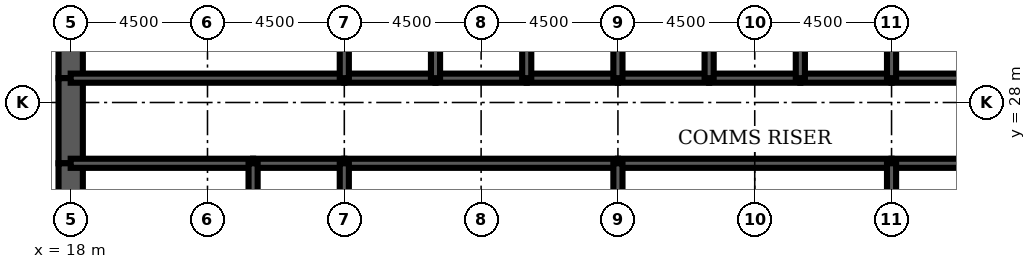
"""IFC4 building model, lengths in metres.
Left out: names, types, materials, properties, quantities, classifications, styles, units other than length and angle.
Written with IfcOpenShell. Run it as: python <this file> out.ifc"""

import sys

from ifc_helpers import new_model, si_unit, direction, frame, frame_2d, origin, place, context, subcontext, project, spatial, rectangle, extrude, element, fill, save


model = new_model("IFC4")
c1 = context("Model", 3, precision=1e-05, world=origin(), true_north=direction((0.0, 1.0)))
c2 = subcontext(c1, "Body", "Model", "MODEL_VIEW")
j1 = project(units=[si_unit("LENGTHUNIT", "METRE"), si_unit("PLANEANGLEUNIT", "RADIAN")], contexts=[c1])
p1 = place(None, origin())
s1 = spatial("IfcSite", under=j1, at=p1, CompositionType="ELEMENT")
p2 = place(p1, origin())
s2 = spatial("IfcBuilding", under=s1, at=p2, CompositionType="ELEMENT")
p3 = place(p2, frame((0.0, 0.0, 219.4)))
s3 = spatial("IfcBuildingStorey", under=s2, at=p3, CompositionType="ELEMENT", Elevation=219.4)
p4 = place(p3, frame((18.0, 32.0, 0.0), z_axis=(0.0, 0.0, 1.0), x_axis=(0.0, -1.0, 0.0)))
e1 = element("IfcWall", 1, at=p4, inside=s3, PredefinedType="SHEAR", context=c2, shape_type="SweptSolid", body=[
    extrude(rectangle(XDim=3.2, YDim=0.8, at=frame_2d((1.6, 0.0))), origin(), (0.0, 0.0, 1.0), 4.2),
])
p5 = place(p3, frame((18.0, 28.8, 0.0), z_axis=(0.0, 0.0, 1.0), x_axis=(0.0, -1.0, 0.0)))
e2 = element("IfcWall", 2, at=p5, inside=s3, PredefinedType="SHEAR", context=c2, shape_type="SweptSolid", body=[
    extrude(rectangle(XDim=2.8, YDim=0.8, at=frame_2d((1.4, 0.0))), origin(), (0.0, 0.0, 1.0), 4.2),
])
p6 = place(p5, frame((0.4, 0.0, 0.0)))
e3 = element("IfcOpeningElement", 3, at=p6, cuts=e2, PredefinedType="OPENING", context=c2, shape_type="SweptSolid", body=[
    extrude(rectangle(XDim=1.8, YDim=2.1, at=frame_2d((0.9, 1.05))), frame((0.0, 0.41, 0.0), z_axis=(0.0, -1.0, 0.0), x_axis=(1.0, 0.0, 0.0)), (0.0, 0.0, 1.0), 0.82),
])
p7 = place(p3, frame((18.0, 26.0, 0.0), z_axis=(0.0, 0.0, 1.0), x_axis=(0.0, -1.0, 0.0)))
e4 = element("IfcWall", 4, at=p7, inside=s3, PredefinedType="SHEAR", context=c2, shape_type="SweptSolid", body=[
    extrude(rectangle(XDim=4.0, YDim=0.8, at=frame_2d((2.0, 0.0))), origin(), (0.0, 0.0, 1.0), 4.2),
])
p8 = place(p3, frame((18.0, 28.8, 0.0), z_axis=(0.0, 0.0, 1.0), x_axis=(1.0, 0.0, 0.0)))
e5 = element("IfcWall", 5, at=p8, inside=s3, PredefinedType="SOLIDWALL", context=c2, shape_type="SweptSolid", body=[
    extrude(rectangle(XDim=9.0, YDim=0.3, at=frame_2d((4.5, 0.0))), origin(), (0.0, 0.0, 1.0), 4.2),
])
p9 = place(p8, frame((0.65, 0.0, 0.0)))
e6 = element("IfcOpeningElement", 6, at=p9, cuts=e5, PredefinedType="OPENING", context=c2, shape_type="SweptSolid", body=[
    extrude(rectangle(XDim=1.0, YDim=2.1, at=frame_2d((0.5, 1.05))), frame((0.0, 0.16, 0.0), z_axis=(0.0, -1.0, 0.0), x_axis=(1.0, 0.0, 0.0)), (0.0, 0.0, 1.0), 0.32),
])
p10 = place(p3, frame((27.0, 28.8, 0.0), z_axis=(0.0, 0.0, 1.0), x_axis=(1.0, 0.0, 0.0)))
e7 = element("IfcWall", 7, at=p10, inside=s3, PredefinedType="SOLIDWALL", context=c2, shape_type="SweptSolid", body=[
    extrude(rectangle(XDim=3.0, YDim=0.3, at=frame_2d((1.5, 0.0))), origin(), (0.0, 0.0, 1.0), 4.2),
])
p11 = place(p10, frame((0.95, 0.0, 0.0)))
e8 = element("IfcOpeningElement", 8, at=p11, cuts=e7, PredefinedType="OPENING", context=c2, shape_type="SweptSolid", body=[
    extrude(rectangle(XDim=1.1, YDim=2.2, at=frame_2d((0.55, 1.1))), frame((0.0, 0.16, 0.0), z_axis=(0.0, -1.0, 0.0), x_axis=(1.0, 0.0, 0.0)), (0.0, 0.0, 1.0), 0.32),
])
p12 = place(p3, frame((30.0, 28.8, 0.0), z_axis=(0.0, 0.0, 1.0), x_axis=(1.0, 0.0, 0.0)))
e9 = element("IfcWall", 9, at=p12, inside=s3, PredefinedType="SOLIDWALL", context=c2, shape_type="SweptSolid", body=[
    extrude(rectangle(XDim=3.0, YDim=0.3, at=frame_2d((1.5, 0.0))), origin(), (0.0, 0.0, 1.0), 4.2),
])
p13 = place(p12, frame((0.95, 0.0, 0.0)))
e10 = element("IfcOpeningElement", 10, at=p13, cuts=e9, PredefinedType="OPENING", context=c2, shape_type="SweptSolid", body=[
    extrude(rectangle(XDim=1.1, YDim=2.2, at=frame_2d((0.55, 1.1))), frame((0.0, 0.16, 0.0), z_axis=(0.0, -1.0, 0.0), x_axis=(1.0, 0.0, 0.0)), (0.0, 0.0, 1.0), 0.32),
])
p14 = place(p3, frame((33.0, 28.8, 0.0), z_axis=(0.0, 0.0, 1.0), x_axis=(1.0, 0.0, 0.0)))
e11 = element("IfcWall", 11, at=p14, inside=s3, PredefinedType="SOLIDWALL", context=c2, shape_type="SweptSolid", body=[
    extrude(rectangle(XDim=3.0, YDim=0.3, at=frame_2d((1.5, 0.0))), origin(), (0.0, 0.0, 1.0), 4.2),
])
p15 = place(p14, frame((0.95, 0.0, 0.0)))
e12 = element("IfcOpeningElement", 12, at=p15, cuts=e11, PredefinedType="OPENING", context=c2, shape_type="SweptSolid", body=[
    extrude(rectangle(XDim=1.1, YDim=2.2, at=frame_2d((0.55, 1.1))), frame((0.0, 0.16, 0.0), z_axis=(0.0, -1.0, 0.0), x_axis=(1.0, 0.0, 0.0)), (0.0, 0.0, 1.0), 0.32),
])
for number, where, z_axis, x_axis in (
    (13, (36.0, 28.8, 0.0), (0.0, 0.0, 1.0), (1.0, 0.0, 0.0)),
    (14, (39.0, 28.8, 0.0), (0.0, 0.0, 1.0), (1.0, 0.0, 0.0)),
):
    element("IfcWall", number, at=place(p3, frame(where, z_axis=z_axis, x_axis=x_axis)), inside=s3, PredefinedType="SOLIDWALL", context=c2, shape_type="SweptSolid", body=[
        extrude(rectangle(XDim=3.0, YDim=0.3, at=frame_2d((1.5, 0.0))), origin(), (0.0, 0.0, 1.0), 4.2),
    ])
p16 = place(p3, frame((42.0, 28.8, 0.0), z_axis=(0.0, 0.0, 1.0), x_axis=(1.0, 0.0, 0.0)))
e15 = element("IfcWall", 15, at=p16, inside=s3, PredefinedType="SOLIDWALL", context=c2, shape_type="SweptSolid", body=[
    extrude(rectangle(XDim=3.0, YDim=0.3, at=frame_2d((1.5, 0.0))), origin(), (0.0, 0.0, 1.0), 4.2),
])
p17 = place(p16, frame((0.95, 0.0, 0.0)))
e16 = element("IfcOpeningElement", 16, at=p17, cuts=e15, PredefinedType="OPENING", context=c2, shape_type="SweptSolid", body=[
    extrude(rectangle(XDim=1.1, YDim=2.2, at=frame_2d((0.55, 1.1))), frame((0.0, 0.16, 0.0), z_axis=(0.0, -1.0, 0.0), x_axis=(1.0, 0.0, 0.0)), (0.0, 0.0, 1.0), 0.32),
])
p18 = place(p3, frame((45.0, 28.8, 0.0), z_axis=(0.0, 0.0, 1.0), x_axis=(1.0, 0.0, 0.0)))
e17 = element("IfcWall", 17, at=p18, inside=s3, PredefinedType="SOLIDWALL", context=c2, shape_type="SweptSolid", body=[
    extrude(rectangle(XDim=9.0, YDim=0.3, at=frame_2d((4.5, 0.0))), origin(), (0.0, 0.0, 1.0), 4.2),
])
p19 = place(p18, frame((7.35, 0.0, 0.0)))
e18 = element("IfcOpeningElement", 18, at=p19, cuts=e17, PredefinedType="OPENING", context=c2, shape_type="SweptSolid", body=[
    extrude(rectangle(XDim=1.0, YDim=2.1, at=frame_2d((0.5, 1.05))), frame((0.0, 0.16, 0.0), z_axis=(0.0, -1.0, 0.0), x_axis=(1.0, 0.0, 0.0)), (0.0, 0.0, 1.0), 0.32),
])
p20 = place(p3, frame((18.0, 26.0, 0.0), z_axis=(0.0, 0.0, 1.0), x_axis=(1.0, 0.0, 0.0)))
e19 = element("IfcWall", 19, at=p20, inside=s3, PredefinedType="SOLIDWALL", context=c2, shape_type="SweptSolid", body=[
    extrude(rectangle(XDim=6.0, YDim=0.3, at=frame_2d((3.0, 0.0))), origin(), (0.0, 0.0, 1.0), 4.2),
])
p21 = place(p3, frame((24.0, 26.0, 0.0), z_axis=(0.0, 0.0, 1.0), x_axis=(1.0, 0.0, 0.0)))
e20 = element("IfcWall", 20, at=p21, inside=s3, PredefinedType="SOLIDWALL", context=c2, shape_type="SweptSolid", body=[
    extrude(rectangle(XDim=3.0, YDim=0.3, at=frame_2d((1.5, 0.0))), origin(), (0.0, 0.0, 1.0), 4.2),
])
for number, where, z_axis, x_axis in (
    (21, (27.0, 26.0, 0.0), (0.0, 0.0, 1.0), (1.0, 0.0, 0.0)),
    (22, (36.0, 26.0, 0.0), (0.0, 0.0, 1.0), (1.0, 0.0, 0.0)),
):
    element("IfcWall", number, at=place(p3, frame(where, z_axis=z_axis, x_axis=x_axis)), inside=s3, PredefinedType="SOLIDWALL", context=c2, shape_type="SweptSolid", body=[
        extrude(rectangle(XDim=9.0, YDim=0.3, at=frame_2d((4.5, 0.0))), origin(), (0.0, 0.0, 1.0), 4.2),
    ])
p22 = place(p3, frame((45.0, 26.0, 0.0), z_axis=(0.0, 0.0, 1.0), x_axis=(1.0, 0.0, 0.0)))
e23 = element("IfcWall", 23, at=p22, inside=s3, PredefinedType="SOLIDWALL", context=c2, shape_type="SweptSolid", body=[
    extrude(rectangle(XDim=3.0, YDim=0.3, at=frame_2d((1.5, 0.0))), origin(), (0.0, 0.0, 1.0), 4.2),
])
for number, where, z_axis, x_axis in (
    (24, (27.0, 28.8, 0.0), (0.0, 0.0, 1.0), (0.0, 1.0, 0.0)),
    (25, (30.0, 28.8, 0.0), (0.0, 0.0, 1.0), (0.0, 1.0, 0.0)),
    (26, (33.0, 28.8, 0.0), (0.0, 0.0, 1.0), (0.0, 1.0, 0.0)),
    (27, (36.0, 28.8, 0.0), (0.0, 0.0, 1.0), (0.0, 1.0, 0.0)),
    (28, (39.0, 28.8, 0.0), (0.0, 0.0, 1.0), (0.0, 1.0, 0.0)),
    (29, (42.0, 28.8, 0.0), (0.0, 0.0, 1.0), (0.0, 1.0, 0.0)),
    (30, (45.0, 28.8, 0.0), (0.0, 0.0, 1.0), (0.0, 1.0, 0.0)),
):
    element("IfcWall", number, at=place(p3, frame(where, z_axis=z_axis, x_axis=x_axis)), inside=s3, PredefinedType="SOLIDWALL", context=c2, shape_type="SweptSolid", body=[
        extrude(rectangle(XDim=3.2, YDim=0.3, at=frame_2d((1.6, 0.0))), origin(), (0.0, 0.0, 1.0), 4.2),
    ])
for number, where, z_axis, x_axis in (
    (31, (24.0, 22.0, 0.0), (0.0, 0.0, 1.0), (0.0, 1.0, 0.0)),
    (32, (27.0, 22.0, 0.0), (0.0, 0.0, 1.0), (0.0, 1.0, 0.0)),
    (33, (36.0, 22.0, 0.0), (0.0, 0.0, 1.0), (0.0, 1.0, 0.0)),
    (34, (45.0, 22.0, 0.0), (0.0, 0.0, 1.0), (0.0, 1.0, 0.0)),
):
    element("IfcWall", number, at=place(p3, frame(where, z_axis=z_axis, x_axis=x_axis)), inside=s3, PredefinedType="SOLIDWALL", context=c2, shape_type="SweptSolid", body=[
        extrude(rectangle(XDim=4.0, YDim=0.3, at=frame_2d((2.0, 0.0))), origin(), (0.0, 0.0, 1.0), 4.2),
    ])
p23 = place(p3, frame((38.5, 22.15, 0.0), z_axis=(0.0, 0.0, 1.0), x_axis=(0.0, 1.0, 0.0)))
e35 = element("IfcWall", 35, at=p23, inside=s3, PredefinedType="PARTITIONING", context=c2, shape_type="SweptSolid", body=[
    extrude(rectangle(XDim=3.7, YDim=0.15, at=frame_2d((1.85, 0.0))), origin(), (0.0, 0.0, 1.0), 3.0),
])
p24 = place(p23, frame((2.2, 0.0, 0.0)))
e36 = element("IfcOpeningElement", 36, at=p24, cuts=e35, PredefinedType="OPENING", context=c2, shape_type="SweptSolid", body=[
    extrude(rectangle(XDim=1.0, YDim=2.1, at=frame_2d((0.5, 1.05))), frame((0.0, 0.085, 0.0), z_axis=(0.0, -1.0, 0.0), x_axis=(1.0, 0.0, 0.0)), (0.0, 0.0, 1.0), 0.17),
])
p25 = place(p3, frame((20.275, 22.15, 0.0), z_axis=(0.0, 0.0, 1.0), x_axis=(0.0, 1.0, 0.0)))
e37 = element("IfcWall", 37, at=p25, inside=s3, PredefinedType="PARTITIONING", context=c2, shape_type="SweptSolid", body=[
    extrude(rectangle(XDim=3.7, YDim=0.15, at=frame_2d((1.85, 0.0))), origin(), (0.0, 0.0, 1.0), 3.0),
])
p26 = place(p3, frame((46.2, 26.15, 0.0), z_axis=(0.0, 0.0, 1.0), x_axis=(0.0, 1.0, 0.0)))
e38 = element("IfcWall", 38, at=p26, inside=s3, PredefinedType="PARTITIONING", context=c2, shape_type="SweptSolid", body=[
    extrude(rectangle(XDim=2.5, YDim=0.15, at=frame_2d((1.25, 0.0))), origin(), (0.0, 0.0, 1.0), 3.0),
])
p27 = place(p26, frame((1.15, 0.0, 0.0)))
e39 = element("IfcOpeningElement", 39, at=p27, cuts=e38, PredefinedType="OPENING", context=c2, shape_type="SweptSolid", body=[
    extrude(rectangle(XDim=1.0, YDim=2.1, at=frame_2d((0.5, 1.05))), frame((0.0, 0.085, 0.0), z_axis=(0.0, -1.0, 0.0), x_axis=(1.0, 0.0, 0.0)), (0.0, 0.0, 1.0), 0.17),
])
p28 = place(p24, origin())
e40 = element("IfcDoor", 40, at=p28, inside=s3, OperationType="SINGLE_SWING_RIGHT", PredefinedType="DOOR", context=c2, shape_type="SweptSolid", body=[
    extrude(rectangle(XDim=1.0, YDim=2.1, at=frame_2d((0.5, 1.05))), frame((0.0, 0.025, 0.0), z_axis=(0.0, -1.0, 0.0), x_axis=(1.0, 0.0, 0.0)), (0.0, 0.0, 1.0), 0.05),
])
fill(e36, e40)
p29 = place(p27, origin())
e41 = element("IfcDoor", 41, at=p29, inside=s3, OperationType="SINGLE_SWING_RIGHT", PredefinedType="DOOR", context=c2, shape_type="SweptSolid", body=[
    extrude(rectangle(XDim=1.0, YDim=2.1, at=frame_2d((0.5, 1.05))), frame((0.0, 0.025, 0.0), z_axis=(0.0, -1.0, 0.0), x_axis=(1.0, 0.0, 0.0)), (0.0, 0.0, 1.0), 0.05),
])
fill(e39, e41)
p30 = place(p17, origin())
e42 = element("IfcDoor", 42, at=p30, inside=s3, OperationType="DOUBLE_DOOR_SLIDING", PredefinedType="USERDEFINED", context=c2, shape_type="SweptSolid", body=[
    extrude(rectangle(XDim=1.1, YDim=2.2, at=frame_2d((0.55, 1.1))), frame((0.0, 0.025, 0.0), z_axis=(0.0, -1.0, 0.0), x_axis=(1.0, 0.0, 0.0)), (0.0, 0.0, 1.0), 0.05),
])
fill(e16, e42)
p31 = place(p11, origin())
e43 = element("IfcDoor", 43, at=p31, inside=s3, OperationType="DOUBLE_DOOR_SLIDING", PredefinedType="USERDEFINED", context=c2, shape_type="SweptSolid", body=[
    extrude(rectangle(XDim=1.1, YDim=2.2, at=frame_2d((0.55, 1.1))), frame((0.0, 0.025, 0.0), z_axis=(0.0, -1.0, 0.0), x_axis=(1.0, 0.0, 0.0)), (0.0, 0.0, 1.0), 0.05),
])
fill(e8, e43)
p32 = place(p13, origin())
e44 = element("IfcDoor", 44, at=p32, inside=s3, OperationType="DOUBLE_DOOR_SLIDING", PredefinedType="USERDEFINED", context=c2, shape_type="SweptSolid", body=[
    extrude(rectangle(XDim=1.1, YDim=2.2, at=frame_2d((0.55, 1.1))), frame((0.0, 0.025, 0.0), z_axis=(0.0, -1.0, 0.0), x_axis=(1.0, 0.0, 0.0)), (0.0, 0.0, 1.0), 0.05),
])
fill(e10, e44)
p33 = place(p15, origin())
e45 = element("IfcDoor", 45, at=p33, inside=s3, OperationType="DOUBLE_DOOR_SLIDING", PredefinedType="USERDEFINED", context=c2, shape_type="SweptSolid", body=[
    extrude(rectangle(XDim=1.1, YDim=2.2, at=frame_2d((0.55, 1.1))), frame((0.0, 0.025, 0.0), z_axis=(0.0, -1.0, 0.0), x_axis=(1.0, 0.0, 0.0)), (0.0, 0.0, 1.0), 0.05),
])
fill(e12, e45)
p34 = place(p9, origin())
e46 = element("IfcDoor", 46, at=p34, inside=s3, OperationType="SINGLE_SWING_LEFT", PredefinedType="DOOR", context=c2, shape_type="SweptSolid", body=[
    extrude(rectangle(XDim=1.0, YDim=2.1, at=frame_2d((0.5, 1.05))), frame((0.0, 0.025, 0.0), z_axis=(0.0, -1.0, 0.0), x_axis=(1.0, 0.0, 0.0)), (0.0, 0.0, 1.0), 0.05),
])
fill(e6, e46)
p35 = place(p6, origin())
e47 = element("IfcDoor", 47, at=p35, inside=s3, OperationType="SINGLE_SWING_LEFT", PredefinedType="DOOR", context=c2, shape_type="SweptSolid", body=[
    extrude(rectangle(XDim=1.8, YDim=2.1, at=frame_2d((0.9, 1.05))), frame((0.0, 0.4, 0.0), z_axis=(0.0, -1.0, 0.0), x_axis=(1.0, 0.0, 0.0)), (0.0, 0.0, 1.0), 0.8),
])
fill(e3, e47)
save(model, sys.argv[1])
